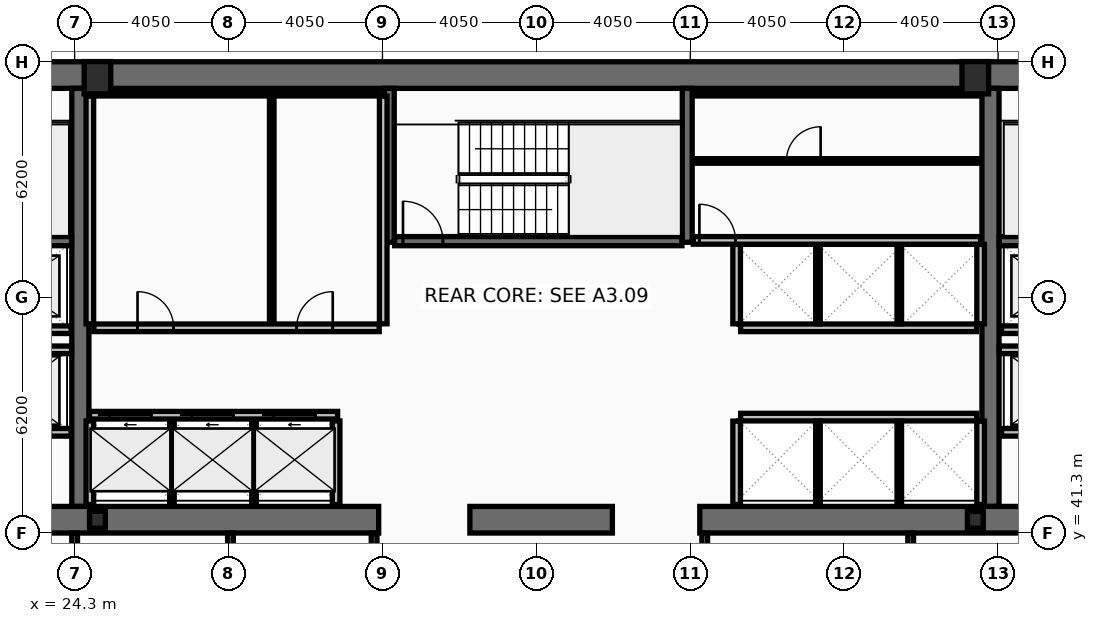
"""IFC4 building model, lengths in metres.
Left out: names, types, materials, properties, quantities, classifications, styles, units other than length and angle.
Written with IfcOpenShell. Run it as: python <this file> out.ifc"""

import sys

from ifc_helpers import new_model, si_unit, direction, frame, frame_2d, origin, origin_2d, place, context, subcontext, project, spatial, rectangle, hollow_rectangle, i_section, extrude, element, fill, save


model = new_model("IFC4")
c1 = context("Model", 3, precision=1e-05, world=origin(), true_north=direction((0.0, 1.0)))
c2 = subcontext(c1, "Body", "Model", "MODEL_VIEW")
j1 = project(units=[si_unit("LENGTHUNIT", "METRE"), si_unit("PLANEANGLEUNIT", "RADIAN")], contexts=[c1])
p1 = place(None, origin())
s1 = spatial("IfcSite", under=j1, at=p1, CompositionType="ELEMENT")
p2 = place(p1, origin())
s2 = spatial("IfcBuilding", under=s1, at=p2, CompositionType="ELEMENT")
p3 = place(p2, frame((0.0, 0.0, 129.0)))
s3 = spatial("IfcBuildingStorey", under=s2, at=p3, CompositionType="ELEMENT", Elevation=129.0)
p4 = place(p3, frame((16.2, 53.35, 0.0), z_axis=(0.0, 0.0, 1.0), x_axis=(1.0, 0.0, 0.0)))
e1 = element("IfcWall", 1, at=p4, inside=s3, PredefinedType="SHEAR", context=c2, shape_type="SweptSolid", body=[
    extrude(rectangle(XDim=40.5, YDim=0.7, at=frame_2d((20.25, 0.0))), origin(), (0.0, 0.0, 1.0), 3.44),
])
for number, where, z_axis, x_axis in (
    (2, (24.45, 42.0, 0.0), (0.0, 0.0, 1.0), (0.0, 1.0, 0.0)),
    (3, (48.4, 42.0, 0.0), (0.0, 0.0, 1.0), (0.0, 1.0, 0.0)),
):
    element("IfcWall", number, at=place(p3, frame(where, z_axis=z_axis, x_axis=x_axis)), inside=s3, PredefinedType="SHEAR", context=c2, shape_type="SweptSolid", body=[
        extrude(rectangle(XDim=11.0, YDim=0.45, at=frame_2d((5.5, 0.0))), origin(), (0.0, 0.0, 1.0), 3.44),
    ])
p5 = place(p3, frame((32.3, 41.65, 0.0), z_axis=(0.0, 0.0, 1.0), x_axis=(-1.0, 0.0, 0.0)))
e4 = element("IfcWall", 4, at=p5, inside=s3, PredefinedType="SHEAR", context=c2, shape_type="SweptSolid", body=[
    extrude(rectangle(XDim=11.45, YDim=0.7, at=frame_2d((5.725, 0.0))), origin(), (0.0, 0.0, 1.0), 3.44),
])
p6 = place(p3, frame((38.45, 41.65, 0.0), z_axis=(0.0, 0.0, 1.0), x_axis=(-1.0, 0.0, 0.0)))
e5 = element("IfcWall", 5, at=p6, inside=s3, PredefinedType="SHEAR", context=c2, shape_type="SweptSolid", body=[
    extrude(rectangle(XDim=3.75, YDim=0.7, at=frame_2d((1.875, 0.0))), origin(), (0.0, 0.0, 1.0), 3.44),
])
p7 = place(p3, frame((52.05, 41.65, 0.0), z_axis=(0.0, 0.0, 1.0), x_axis=(-1.0, 0.0, 0.0)))
e6 = element("IfcWall", 6, at=p7, inside=s3, PredefinedType="SHEAR", context=c2, shape_type="SweptSolid", body=[
    extrude(rectangle(XDim=11.3, YDim=0.7, at=frame_2d((5.65, 0.0))), origin(), (0.0, 0.0, 1.0), 3.44),
])
for number, where, z_axis, x_axis in (
    (7, (32.58, 48.95, 0.0), (0.0, 0.0, 1.0), (0.0, 1.0, 0.0)),
    (8, (40.42, 48.95, 0.0), (0.0, 0.0, 1.0), (0.0, 1.0, 0.0)),
):
    element("IfcWall", number, at=place(p3, frame(where, z_axis=z_axis, x_axis=x_axis)), inside=s3, PredefinedType="SHEAR", context=c2, shape_type="SweptSolid", body=[
        extrude(rectangle(XDim=4.05, YDim=0.26, at=frame_2d((2.025, 0.0))), origin(), (0.0, 0.0, 1.0), 3.44),
    ])
p8 = place(p3, frame((16.9, 48.98, 0.0), z_axis=(0.0, 0.0, 1.0), x_axis=(1.0, 0.0, 0.0)))
e9 = element("IfcWall", 9, at=p8, inside=s3, PredefinedType="SHEAR", context=c2, shape_type="SweptSolid", body=[
    extrude(rectangle(XDim=7.32, YDim=0.24, at=frame_2d((3.66, 0.0))), origin(), (0.0, 0.0, 1.0), 3.44),
])
p9 = place(p8, frame((0.22, 0.0, 0.0)))
e10 = element("IfcOpeningElement", 10, at=p9, cuts=e9, PredefinedType="OPENING", context=c2, shape_type="SweptSolid", body=[
    extrude(rectangle(XDim=1.05, YDim=2.15, at=frame_2d((0.525, 1.075))), frame((0.0, 0.13, 0.0), z_axis=(0.0, -1.0, 0.0), x_axis=(1.0, 0.0, 0.0)), (0.0, 0.0, 1.0), 0.26),
])
p10 = place(p3, frame((48.63, 48.98, 0.0), z_axis=(0.0, 0.0, 1.0), x_axis=(1.0, 0.0, 0.0)))
e11 = element("IfcWall", 11, at=p10, inside=s3, PredefinedType="SHEAR", context=c2, shape_type="SweptSolid", body=[
    extrude(rectangle(XDim=7.37, YDim=0.24, at=frame_2d((3.685, 0.0))), origin(), (0.0, 0.0, 1.0), 3.44),
])
p11 = place(p10, frame((6.1, 0.0, 0.0)))
e12 = element("IfcOpeningElement", 12, at=p11, cuts=e11, PredefinedType="OPENING", context=c2, shape_type="SweptSolid", body=[
    extrude(rectangle(XDim=1.05, YDim=2.15, at=frame_2d((0.525, 1.075))), frame((0.0, 0.13, 0.0), z_axis=(0.0, -1.0, 0.0), x_axis=(1.0, 0.0, 0.0)), (0.0, 0.0, 1.0), 0.26),
])
p12 = place(p3, frame((32.72, 48.98, 0.0), z_axis=(0.0, 0.0, 1.0), x_axis=(1.0, 0.0, 0.0)))
e13 = element("IfcWall", 13, at=p12, inside=s3, PredefinedType="SHEAR", context=c2, shape_type="SweptSolid", body=[
    extrude(rectangle(XDim=7.56, YDim=0.24, at=frame_2d((3.78, 0.0))), origin(), (0.0, 0.0, 1.0), 3.44),
])
p13 = place(p12, frame((0.22, 0.0, 0.0)))
e14 = element("IfcOpeningElement", 14, at=p13, cuts=e13, PredefinedType="OPENING", context=c2, shape_type="SweptSolid", body=[
    extrude(rectangle(XDim=1.05, YDim=2.15, at=frame_2d((0.525, 1.075))), frame((0.0, 0.13, 0.0), z_axis=(0.0, -1.0, 0.0), x_axis=(1.0, 0.0, 0.0)), (0.0, 0.0, 1.0), 0.26),
])
for number, where, z_axis, x_axis in (
    (15, (24.9, 53.28, 0.0), (0.0, 0.0, 1.0), (1.0, 0.0, 0.0)),
    (16, (48.0, 53.28, 0.0), (0.0, 0.0, 1.0), (1.0, 0.0, 0.0)),
):
    element("IfcColumn", number, at=place(p3, frame(where, z_axis=z_axis, x_axis=x_axis)), inside=s3, PredefinedType="COLUMN", context=c2, shape_type="SweptSolid", body=[
        extrude(hollow_rectangle(XDim=0.7, YDim=0.85, WallThickness=0.05, at=origin_2d()), origin(), (0.0, 0.0, 1.0), 3.6),
    ])
for number, where, z_axis, x_axis in (
    (17, (24.9, 41.65, 0.0), (0.0, 0.0, 1.0), (1.0, 0.0, 0.0)),
    (18, (48.0, 41.65, 0.0), (0.0, 0.0, 1.0), (1.0, 0.0, 0.0)),
):
    element("IfcColumn", number, at=place(p3, frame(where, z_axis=z_axis, x_axis=x_axis)), inside=s3, PredefinedType="COLUMN", context=c2, shape_type="SweptSolid", body=[
        extrude(i_section(OverallWidth=0.416, OverallDepth=0.446, WebThickness=0.039, FlangeThickness=0.063, at=origin_2d()), origin(), (0.0, 0.0, 1.0), 3.6),
    ])
p14 = place(p3, frame((24.69, 44.4, 0.0), z_axis=(0.0, 0.0, 1.0), x_axis=(1.0, 0.0, 0.0)))
e19 = element("IfcWall", 19, at=p14, inside=s3, PredefinedType="PARTITIONING", context=c2, shape_type="SweptSolid", body=[
    extrude(rectangle(XDim=6.53, YDim=0.2, at=frame_2d((3.265, 0.0))), origin(), (0.0, 0.0, 1.0), 3.44),
])
p15 = place(p14, frame((0.53, 0.0, 0.0)))
e20 = element("IfcOpeningElement", 20, at=p15, cuts=e19, PredefinedType="OPENING", context=c2, shape_type="SweptSolid", body=[
    extrude(rectangle(XDim=1.1, YDim=2.18, at=frame_2d((0.55, 1.09))), frame((0.0, 0.11, 0.0), z_axis=(0.0, -1.0, 0.0), x_axis=(1.0, 0.0, 0.0)), (0.0, 0.0, 1.0), 0.22),
])
p16 = place(p14, frame((2.69, 0.0, 0.0)))
e21 = element("IfcOpeningElement", 21, at=p16, cuts=e19, PredefinedType="OPENING", context=c2, shape_type="SweptSolid", body=[
    extrude(rectangle(XDim=1.1, YDim=2.18, at=frame_2d((0.55, 1.09))), frame((0.0, 0.11, 0.0), z_axis=(0.0, -1.0, 0.0), x_axis=(1.0, 0.0, 0.0)), (0.0, 0.0, 1.0), 0.22),
])
p17 = place(p14, frame((4.85, 0.0, 0.0)))
e22 = element("IfcOpeningElement", 22, at=p17, cuts=e19, PredefinedType="OPENING", context=c2, shape_type="SweptSolid", body=[
    extrude(rectangle(XDim=1.1, YDim=2.18, at=frame_2d((0.55, 1.09))), frame((0.0, 0.11, 0.0), z_axis=(0.0, -1.0, 0.0), x_axis=(1.0, 0.0, 0.0)), (0.0, 0.0, 1.0), 0.22),
])
p18 = place(p3, frame((51.61, 43.95, 0.0), z_axis=(0.0, 0.0, 1.0), x_axis=(-1.0, 0.0, 0.0)))
e23 = element("IfcWall", 23, at=p18, inside=s3, PredefinedType="PARTITIONING", context=c2, shape_type="SweptSolid", body=[
    extrude(rectangle(XDim=2.92, YDim=0.2, at=frame_2d((1.46, 0.0))), origin(), (0.0, 0.0, 1.0), 3.44),
])
p19 = place(p18, frame((0.81, 0.0, 0.0)))
e24 = element("IfcOpeningElement", 24, at=p19, cuts=e23, PredefinedType="OPENING", context=c2, shape_type="SweptSolid", body=[
    extrude(rectangle(XDim=1.3, YDim=2.18, at=frame_2d((0.65, 1.09))), frame((0.0, 0.11, 0.0), z_axis=(0.0, -1.0, 0.0), x_axis=(1.0, 0.0, 0.0)), (0.0, 0.0, 1.0), 0.22),
])
p20 = place(p3, frame((24.21, 43.95, 0.0), z_axis=(0.0, 0.0, 1.0), x_axis=(-1.0, 0.0, 0.0)))
e25 = element("IfcWall", 25, at=p20, inside=s3, PredefinedType="PARTITIONING", context=c2, shape_type="SweptSolid", body=[
    extrude(rectangle(XDim=2.97, YDim=0.2, at=frame_2d((1.485, 0.0))), origin(), (0.0, 0.0, 1.0), 3.44),
])
p21 = place(p20, frame((0.86, 0.0, 0.0)))
e26 = element("IfcOpeningElement", 26, at=p21, cuts=e25, PredefinedType="OPENING", context=c2, shape_type="SweptSolid", body=[
    extrude(rectangle(XDim=1.3, YDim=2.18, at=frame_2d((0.65, 1.09))), frame((0.0, 0.11, 0.0), z_axis=(0.0, -1.0, 0.0), x_axis=(1.0, 0.0, 0.0)), (0.0, 0.0, 1.0), 0.22),
])
p22 = place(p3, frame((51.61, 46.65, 0.0), z_axis=(0.0, 0.0, 1.0), x_axis=(-1.0, 0.0, 0.0)))
e27 = element("IfcWall", 27, at=p22, inside=s3, PredefinedType="PARTITIONING", context=c2, shape_type="SweptSolid", body=[
    extrude(rectangle(XDim=2.92, YDim=0.2, at=frame_2d((1.46, 0.0))), origin(), (0.0, 0.0, 1.0), 3.44),
])
p23 = place(p22, frame((0.86, 0.0, 0.0)))
e28 = element("IfcOpeningElement", 28, at=p23, cuts=e27, PredefinedType="OPENING", context=c2, shape_type="SweptSolid", body=[
    extrude(rectangle(XDim=1.2, YDim=2.18, at=frame_2d((0.6, 1.09))), frame((0.0, 0.11, 0.0), z_axis=(0.0, -1.0, 0.0), x_axis=(1.0, 0.0, 0.0)), (0.0, 0.0, 1.0), 0.22),
])
p24 = place(p3, frame((24.21, 46.65, 0.0), z_axis=(0.0, 0.0, 1.0), x_axis=(-1.0, 0.0, 0.0)))
e29 = element("IfcWall", 29, at=p24, inside=s3, PredefinedType="PARTITIONING", context=c2, shape_type="SweptSolid", body=[
    extrude(rectangle(XDim=2.97, YDim=0.2, at=frame_2d((1.485, 0.0))), origin(), (0.0, 0.0, 1.0), 3.44),
])
p25 = place(p24, frame((0.91, 0.0, 0.0)))
e30 = element("IfcOpeningElement", 30, at=p25, cuts=e29, PredefinedType="OPENING", context=c2, shape_type="SweptSolid", body=[
    extrude(rectangle(XDim=1.2, YDim=2.18, at=frame_2d((0.6, 1.09))), frame((0.0, 0.11, 0.0), z_axis=(0.0, -1.0, 0.0), x_axis=(1.0, 0.0, 0.0)), (0.0, 0.0, 1.0), 0.22),
])
p26 = place(p3, frame((21.2, 46.12, 0.0), z_axis=(0.0, 0.0, 1.0), x_axis=(1.0, 0.0, 0.0)))
e31 = element("IfcWall", 31, at=p26, inside=s3, PredefinedType="PARTITIONING", context=c2, shape_type="SweptSolid", body=[
    extrude(rectangle(XDim=3.02, YDim=0.2, at=frame_2d((1.51, 0.0))), origin(), (0.0, 0.0, 1.0), 3.44),
])
p27 = place(p3, frame((48.63, 46.12, 0.0), z_axis=(0.0, 0.0, 1.0), x_axis=(1.0, 0.0, 0.0)))
e32 = element("IfcWall", 32, at=p27, inside=s3, PredefinedType="PARTITIONING", context=c2, shape_type="SweptSolid", body=[
    extrude(rectangle(XDim=3.07, YDim=0.2, at=frame_2d((1.535, 0.0))), origin(), (0.0, 0.0, 1.0), 3.44),
])
for number, where, z_axis, x_axis in (
    (33, (24.7, 46.805, 0.0), (0.0, 0.0, 1.0), (0.0, 1.0, 0.0)),
    (34, (32.42, 46.805, 0.0), (0.0, 0.0, 1.0), (0.0, 1.0, 0.0)),
):
    element("IfcWall", number, at=place(p3, frame(where, z_axis=z_axis, x_axis=x_axis)), inside=s3, PredefinedType="PARTITIONING", context=c2, shape_type="SweptSolid", body=[
        extrude(rectangle(XDim=5.99, YDim=0.2, at=frame_2d((2.995, 0.0))), origin(), (0.0, 0.0, 1.0), 3.44),
    ])
p28 = place(p3, frame((24.805, 52.86, 0.0), z_axis=(0.0, 0.0, 1.0), x_axis=(1.0, 0.0, 0.0)))
e35 = element("IfcWall", 35, at=p28, inside=s3, PredefinedType="PARTITIONING", context=c2, shape_type="SweptSolid", body=[
    extrude(rectangle(XDim=7.51, YDim=0.12, at=frame_2d((3.755, 0.0))), origin(), (0.0, 0.0, 1.0), 3.44),
])
p29 = place(p3, frame((29.486, 46.805, 0.0), z_axis=(0.0, 0.0, 1.0), x_axis=(0.0, 1.0, 0.0)))
e36 = element("IfcWall", 36, at=p29, inside=s3, PredefinedType="PARTITIONING", context=c2, shape_type="SweptSolid", body=[
    extrude(rectangle(XDim=5.99, YDim=0.12, at=frame_2d((2.995, 0.0))), origin(), (0.0, 0.0, 1.0), 3.44),
])
p30 = place(p3, frame((24.805, 46.7, 0.0), z_axis=(0.0, 0.0, 1.0), x_axis=(1.0, 0.0, 0.0)))
e37 = element("IfcWall", 37, at=p30, inside=s3, PredefinedType="PARTITIONING", context=c2, shape_type="SweptSolid", body=[
    extrude(rectangle(XDim=7.51, YDim=0.2, at=frame_2d((3.755, 0.0))), origin(), (0.0, 0.0, 1.0), 3.44),
])
p31 = place(p30, frame((1.15, 0.0, 0.0)))
e38 = element("IfcOpeningElement", 38, at=p31, cuts=e37, PredefinedType="OPENING", context=c2, shape_type="SweptSolid", body=[
    extrude(rectangle(XDim=0.95, YDim=2.1, at=frame_2d((0.475, 1.05))), frame((0.0, 0.11, 0.0), z_axis=(0.0, -1.0, 0.0), x_axis=(1.0, 0.0, 0.0)), (0.0, 0.0, 1.0), 0.22),
])
p32 = place(p30, frame((5.336, 0.0, 0.0)))
e39 = element("IfcOpeningElement", 39, at=p32, cuts=e37, PredefinedType="OPENING", context=c2, shape_type="SweptSolid", body=[
    extrude(rectangle(XDim=0.95, YDim=2.1, at=frame_2d((0.475, 1.05))), frame((0.0, 0.11, 0.0), z_axis=(0.0, -1.0, 0.0), x_axis=(1.0, 0.0, 0.0)), (0.0, 0.0, 1.0), 0.22),
])
for number, where, z_axis, x_axis in (
    (40, (24.7, 42.05, 0.0), (0.0, 0.0, 1.0), (0.0, 1.0, 0.0)),
    (41, (31.18, 42.05, 0.0), (0.0, 0.0, 1.0), (0.0, 1.0, 0.0)),
):
    element("IfcWall", number, at=place(p3, frame(where, z_axis=z_axis, x_axis=x_axis)), inside=s3, PredefinedType="PARTITIONING", context=c2, shape_type="SweptSolid", body=[
        extrude(rectangle(XDim=2.2, YDim=0.2, at=frame_2d((1.1, 0.0))), origin(), (0.0, 0.0, 1.0), 3.44),
    ])
for number, where, z_axis, x_axis in (
    (42, (26.86, 42.05, 0.0), (0.0, 0.0, 1.0), (0.0, 1.0, 0.0)),
    (43, (29.02, 42.05, 0.0), (0.0, 0.0, 1.0), (0.0, 1.0, 0.0)),
):
    element("IfcWall", number, at=place(p3, frame(where, z_axis=z_axis, x_axis=x_axis)), inside=s3, PredefinedType="PARTITIONING", context=c2, shape_type="SweptSolid", body=[
        extrude(rectangle(XDim=2.2, YDim=0.12, at=frame_2d((1.1, 0.0))), origin(), (0.0, 0.0, 1.0), 3.44),
    ])
p33 = place(p3, frame((41.825, 46.7, 0.0), z_axis=(0.0, 0.0, 1.0), x_axis=(1.0, 0.0, 0.0)))
e44 = element("IfcWall", 44, at=p33, inside=s3, PredefinedType="PARTITIONING", context=c2, shape_type="SweptSolid", body=[
    extrude(rectangle(XDim=6.21, YDim=0.2, at=frame_2d((3.105, 0.0))), origin(), (0.0, 0.0, 1.0), 3.44),
])
for number, where, z_axis, x_axis in (
    (45, (41.72, 46.805, 0.0), (0.0, 0.0, 1.0), (0.0, 1.0, 0.0)),
    (46, (48.14, 46.805, 0.0), (0.0, 0.0, 1.0), (0.0, 1.0, 0.0)),
):
    element("IfcWall", number, at=place(p3, frame(where, z_axis=z_axis, x_axis=x_axis)), inside=s3, PredefinedType="PARTITIONING", context=c2, shape_type="SweptSolid", body=[
        extrude(rectangle(XDim=2.09, YDim=0.2, at=frame_2d((1.045, 0.0))), origin(), (0.0, 0.0, 1.0), 3.44),
    ])
for number, where, z_axis, x_axis in (
    (47, (43.86, 46.805, 0.0), (0.0, 0.0, 1.0), (0.0, 1.0, 0.0)),
    (48, (46.0, 46.805, 0.0), (0.0, 0.0, 1.0), (0.0, 1.0, 0.0)),
):
    element("IfcWall", number, at=place(p3, frame(where, z_axis=z_axis, x_axis=x_axis)), inside=s3, PredefinedType="PARTITIONING", context=c2, shape_type="SweptSolid", body=[
        extrude(rectangle(XDim=2.09, YDim=0.12, at=frame_2d((1.045, 0.0))), origin(), (0.0, 0.0, 1.0), 3.44),
    ])
p34 = place(p3, frame((41.825, 44.35, 0.0), z_axis=(0.0, 0.0, 1.0), x_axis=(1.0, 0.0, 0.0)))
e49 = element("IfcWall", 49, at=p34, inside=s3, PredefinedType="PARTITIONING", context=c2, shape_type="SweptSolid", body=[
    extrude(rectangle(XDim=6.21, YDim=0.2, at=frame_2d((3.105, 0.0))), origin(), (0.0, 0.0, 1.0), 3.44),
])
for number, where, z_axis, x_axis in (
    (50, (41.72, 42.05, 0.0), (0.0, 0.0, 1.0), (0.0, 1.0, 0.0)),
    (51, (48.14, 42.05, 0.0), (0.0, 0.0, 1.0), (0.0, 1.0, 0.0)),
):
    element("IfcWall", number, at=place(p3, frame(where, z_axis=z_axis, x_axis=x_axis)), inside=s3, PredefinedType="PARTITIONING", context=c2, shape_type="SweptSolid", body=[
        extrude(rectangle(XDim=2.195, YDim=0.2, at=frame_2d((1.098, 0.0))), origin(), (0.0, 0.0, 1.0), 3.44),
    ])
for number, where, z_axis, x_axis in (
    (52, (43.86, 42.05, 0.0), (0.0, 0.0, 1.0), (0.0, 1.0, 0.0)),
    (53, (46.0, 42.05, 0.0), (0.0, 0.0, 1.0), (0.0, 1.0, 0.0)),
):
    element("IfcWall", number, at=place(p3, frame(where, z_axis=z_axis, x_axis=x_axis)), inside=s3, PredefinedType="PARTITIONING", context=c2, shape_type="SweptSolid", body=[
        extrude(rectangle(XDim=2.195, YDim=0.12, at=frame_2d((1.098, 0.0))), origin(), (0.0, 0.0, 1.0), 3.44),
    ])
p35 = place(p3, frame((40.58, 52.86, 0.0), z_axis=(0.0, 0.0, 1.0), x_axis=(1.0, 0.0, 0.0)))
e54 = element("IfcWall", 54, at=p35, inside=s3, PredefinedType="PARTITIONING", context=c2, shape_type="SweptSolid", body=[
    extrude(rectangle(XDim=7.56, YDim=0.12, at=frame_2d((3.78, 0.0))), origin(), (0.0, 0.0, 1.0), 3.44),
])
p36 = place(p3, frame((40.58, 49.0, 0.0), z_axis=(0.0, 0.0, 1.0), x_axis=(1.0, 0.0, 0.0)))
e55 = element("IfcWall", 55, at=p36, inside=s3, PredefinedType="PARTITIONING", context=c2, shape_type="SweptSolid", body=[
    extrude(rectangle(XDim=7.56, YDim=0.2, at=frame_2d((3.78, 0.0))), origin(), (0.0, 0.0, 1.0), 3.44),
])
p37 = place(p36, frame((0.16, 0.0, 0.0)))
e56 = element("IfcOpeningElement", 56, at=p37, cuts=e55, PredefinedType="OPENING", context=c2, shape_type="SweptSolid", body=[
    extrude(rectangle(XDim=0.95, YDim=2.1, at=frame_2d((0.475, 1.05))), frame((0.0, 0.11, 0.0), z_axis=(0.0, -1.0, 0.0), x_axis=(1.0, 0.0, 0.0)), (0.0, 0.0, 1.0), 0.22),
])
p38 = place(p3, frame((40.63, 51.09, 0.0), z_axis=(0.0, 0.0, 1.0), x_axis=(1.0, 0.0, 0.0)))
e57 = element("IfcWall", 57, at=p38, inside=s3, PredefinedType="PARTITIONING", context=c2, shape_type="SweptSolid", body=[
    extrude(rectangle(XDim=7.46, YDim=0.12, at=frame_2d((3.73, 0.0))), origin(), (0.0, 0.0, 1.0), 3.44),
])
p39 = place(p38, frame((2.4, 0.0, 0.0)))
e58 = element("IfcOpeningElement", 58, at=p39, cuts=e57, PredefinedType="OPENING", context=c2, shape_type="SweptSolid", body=[
    extrude(rectangle(XDim=0.9, YDim=2.05, at=frame_2d((0.45, 1.025))), frame((0.0, 0.07, 0.0), z_axis=(0.0, -1.0, 0.0), x_axis=(1.0, 0.0, 0.0)), (0.0, 0.0, 1.0), 0.14),
])
for number, where, z_axis, x_axis in (
    (59, (24.3, 38.28, 0.0), (0.0, 0.0, 1.0), (0.0, 1.0, 0.0)),
    (60, (28.4, 38.28, 0.0), (0.0, 0.0, 1.0), (0.0, 1.0, 0.0)),
    (61, (32.18, 38.28, 0.0), (0.0, 0.0, 1.0), (0.0, 1.0, 0.0)),
    (62, (40.88, 38.28, 0.0), (0.0, 0.0, 1.0), (0.0, 1.0, 0.0)),
    (63, (46.3, 38.28, 0.0), (0.0, 0.0, 1.0), (0.0, 1.0, 0.0)),
):
    element("IfcWall", number, at=place(p3, frame(where, z_axis=z_axis, x_axis=x_axis)), inside=s3, PredefinedType="PARTITIONING", context=c2, shape_type="SweptSolid", body=[
        extrude(rectangle(XDim=3.02, YDim=0.15, at=frame_2d((1.51, 0.0))), origin(), (0.0, 0.0, 1.0), 3.44),
    ])
p40 = place(p13, origin())
e64 = element("IfcDoor", 64, at=p40, inside=s3, OperationType="SINGLE_SWING_LEFT", PredefinedType="DOOR", context=c2, shape_type="SweptSolid", body=[
    extrude(rectangle(XDim=1.05, YDim=2.15, at=frame_2d((0.525, 1.075))), frame((0.0, 0.025, 0.0), z_axis=(0.0, -1.0, 0.0), x_axis=(1.0, 0.0, 0.0)), (0.0, 0.0, 1.0), 0.05),
])
fill(e14, e64)
p41 = place(p15, origin())
e65 = element("IfcDoor", 65, at=p41, inside=s3, OperationType="SLIDING_TO_LEFT", PredefinedType="DOOR", context=c2, shape_type="SweptSolid", body=[
    extrude(rectangle(XDim=1.1, YDim=2.18, at=frame_2d((0.55, 1.09))), frame((0.0, 0.025, 0.0), z_axis=(0.0, -1.0, 0.0), x_axis=(1.0, 0.0, 0.0)), (0.0, 0.0, 1.0), 0.05),
])
fill(e20, e65)
p42 = place(p16, origin())
e66 = element("IfcDoor", 66, at=p42, inside=s3, OperationType="SLIDING_TO_LEFT", PredefinedType="DOOR", context=c2, shape_type="SweptSolid", body=[
    extrude(rectangle(XDim=1.1, YDim=2.18, at=frame_2d((0.55, 1.09))), frame((0.0, 0.025, 0.0), z_axis=(0.0, -1.0, 0.0), x_axis=(1.0, 0.0, 0.0)), (0.0, 0.0, 1.0), 0.05),
])
fill(e21, e66)
p43 = place(p17, origin())
e67 = element("IfcDoor", 67, at=p43, inside=s3, OperationType="SLIDING_TO_LEFT", PredefinedType="DOOR", context=c2, shape_type="SweptSolid", body=[
    extrude(rectangle(XDim=1.1, YDim=2.18, at=frame_2d((0.55, 1.09))), frame((0.0, 0.025, 0.0), z_axis=(0.0, -1.0, 0.0), x_axis=(1.0, 0.0, 0.0)), (0.0, 0.0, 1.0), 0.05),
])
fill(e22, e67)
p44 = place(p31, origin())
e68 = element("IfcDoor", 68, at=p44, inside=s3, OperationType="SINGLE_SWING_LEFT", PredefinedType="DOOR", context=c2, shape_type="SweptSolid", body=[
    extrude(rectangle(XDim=0.95, YDim=2.1, at=frame_2d((0.475, 1.05))), frame((0.0, 0.025, 0.0), z_axis=(0.0, -1.0, 0.0), x_axis=(1.0, 0.0, 0.0)), (0.0, 0.0, 1.0), 0.05),
])
fill(e38, e68)
p45 = place(p32, origin())
e69 = element("IfcDoor", 69, at=p45, inside=s3, OperationType="SINGLE_SWING_RIGHT", PredefinedType="DOOR", context=c2, shape_type="SweptSolid", body=[
    extrude(rectangle(XDim=0.95, YDim=2.1, at=frame_2d((0.475, 1.05))), frame((0.0, 0.025, 0.0), z_axis=(0.0, -1.0, 0.0), x_axis=(1.0, 0.0, 0.0)), (0.0, 0.0, 1.0), 0.05),
])
fill(e39, e69)
p46 = place(p37, origin())
e70 = element("IfcDoor", 70, at=p46, inside=s3, OperationType="SINGLE_SWING_LEFT", PredefinedType="DOOR", context=c2, shape_type="SweptSolid", body=[
    extrude(rectangle(XDim=0.95, YDim=2.1, at=frame_2d((0.475, 1.05))), frame((0.0, 0.025, 0.0), z_axis=(0.0, -1.0, 0.0), x_axis=(1.0, 0.0, 0.0)), (0.0, 0.0, 1.0), 0.05),
])
fill(e56, e70)
p47 = place(p39, origin())
e71 = element("IfcDoor", 71, at=p47, inside=s3, OperationType="SINGLE_SWING_RIGHT", PredefinedType="DOOR", context=c2, shape_type="SweptSolid", body=[
    extrude(rectangle(XDim=0.9, YDim=2.05, at=frame_2d((0.45, 1.025))), frame((0.0, 0.025, 0.0), z_axis=(0.0, -1.0, 0.0), x_axis=(1.0, 0.0, 0.0)), (0.0, 0.0, 1.0), 0.05),
])
fill(e58, e71)
save(model, sys.argv[1])
